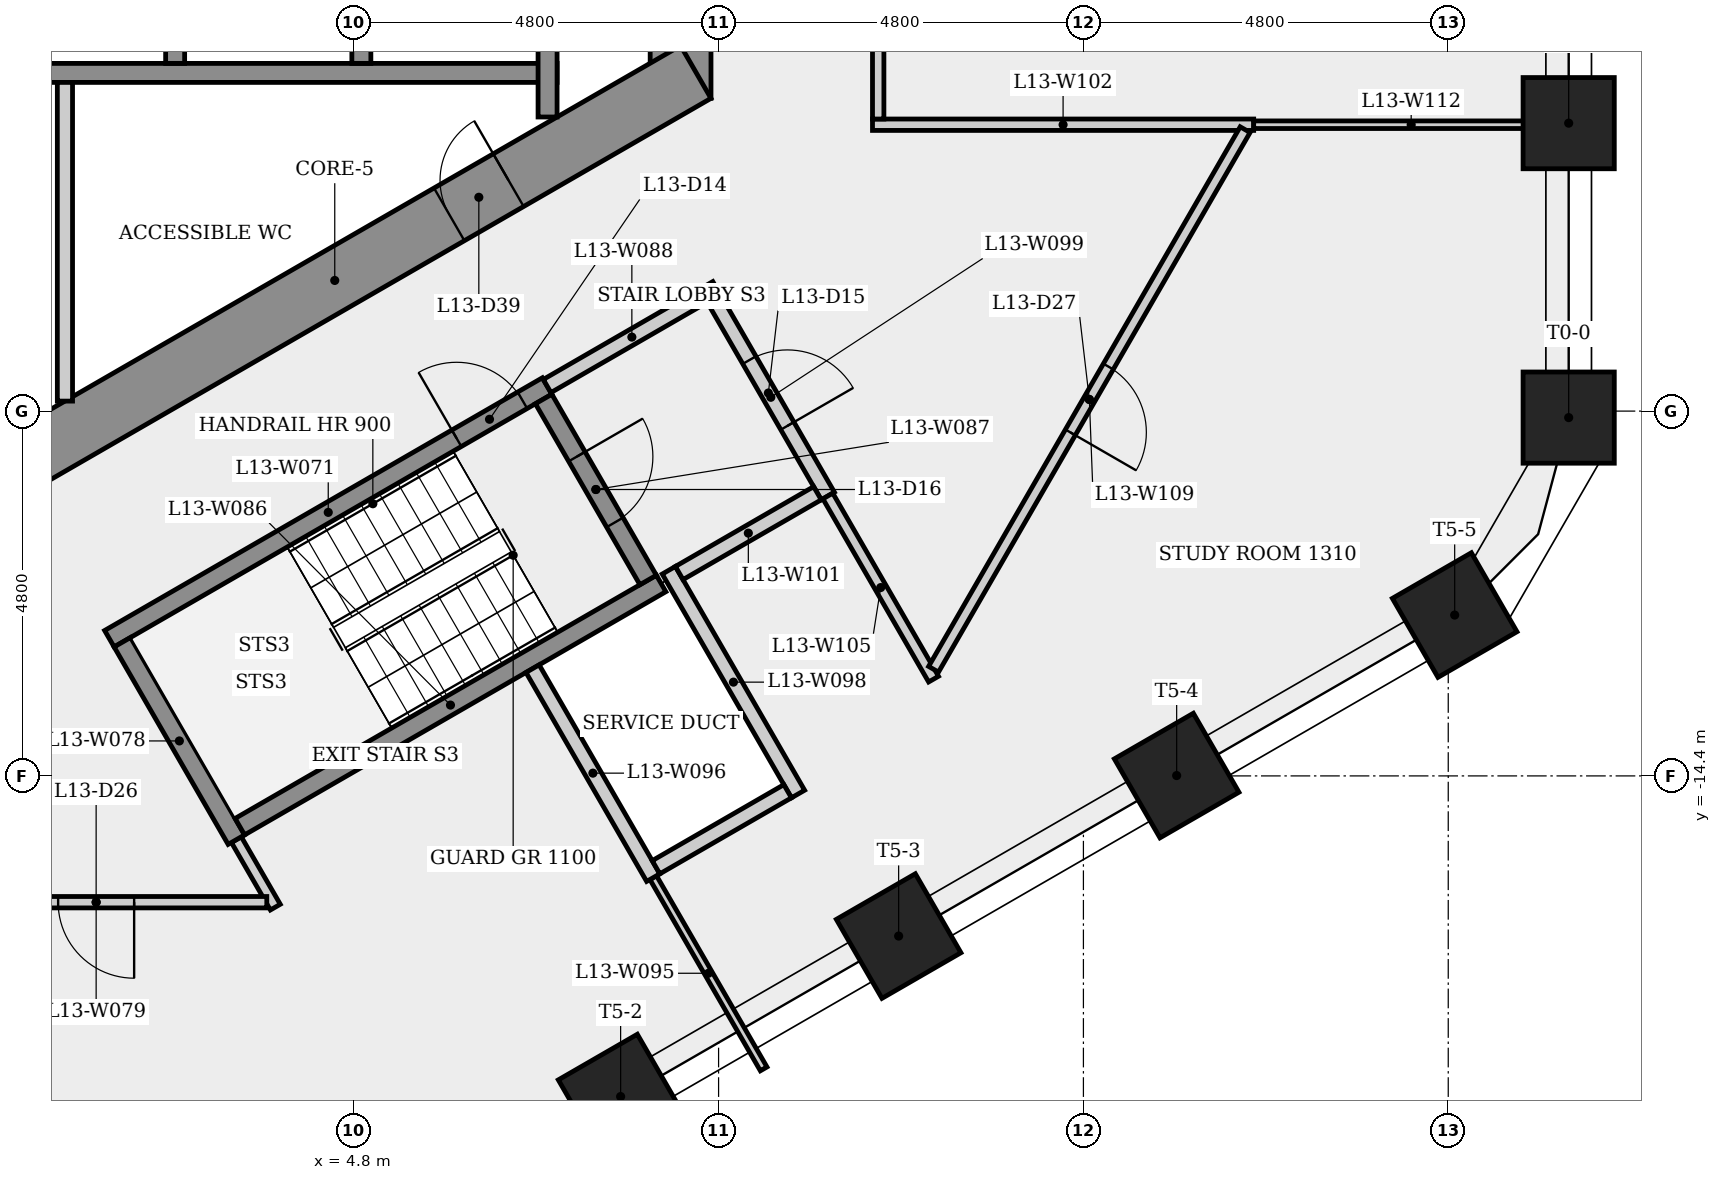
"""IFC4 building model, lengths in metres.
Left out: names, types, materials, properties, quantities, classifications, styles, units other than length and angle.
Written with IfcOpenShell. Run it as: python <this file> out.ifc"""

import sys

from ifc_helpers import new_model, si_unit, direction, frame, frame_2d, origin, origin_2d, place, context, subcontext, project, spatial, rectangle, extrude, element, fill, save


model = new_model("IFC4")
c1 = context("Model", 3, precision=1e-05, world=origin(), true_north=direction((0.0, 1.0)))
c2 = subcontext(c1, "Body", "Model", "MODEL_VIEW")
j1 = project(units=[si_unit("LENGTHUNIT", "METRE"), si_unit("PLANEANGLEUNIT", "RADIAN")], contexts=[c1])
p1 = place(None, origin())
s1 = spatial("IfcSite", under=j1, at=p1, CompositionType="ELEMENT")
p2 = place(p1, origin())
s2 = spatial("IfcBuilding", under=s1, at=p2, CompositionType="ELEMENT")
p3 = place(p2, frame((0.0, 0.0, 52.7)))
s3 = spatial("IfcBuildingStorey", under=s2, at=p3, CompositionType="ELEMENT", Elevation=52.7)
p4 = place(p3, frame((9.1, -5.485, 0.0), z_axis=(0.0, 0.0, 1.0), x_axis=(0.0, 1.0, 0.0)))
e1 = element("IfcWall", 1, at=p4, inside=s3, PredefinedType="SHEAR", context=c2, shape_type="SweptSolid", body=[
    extrude(rectangle(XDim=10.97, YDim=0.8, at=frame_2d((5.485, 0.0))), origin(), (0.0, 0.0, 1.0), 3.4),
])
p5 = place(p4, frame((4.685, 0.0, 0.0)))
e2 = element("IfcOpeningElement", 2, at=p5, cuts=e1, PredefinedType="OPENING", context=c2, shape_type="SweptSolid", body=[
    extrude(rectangle(XDim=1.6, YDim=2.1, at=frame_2d((0.8, 1.05))), frame((0.0, 0.41, 0.0), z_axis=(0.0, -1.0, 0.0), x_axis=(1.0, 0.0, 0.0)), (0.0, 0.0, 1.0), 0.82),
])
p6 = place(p3, frame((-0.2, -10.623, 0.0), z_axis=(0.0, 0.0, 1.0), x_axis=(0.866023993627, 0.500002442456, 0.0)))
e3 = element("IfcWall", 3, at=p6, inside=s3, PredefinedType="SHEAR", context=c2, shape_type="SweptSolid", body=[
    extrude(rectangle(XDim=10.97, YDim=0.8, at=frame_2d((5.485, 0.0))), origin(), (0.0, 0.0, 1.0), 3.4),
])
p7 = place(p6, frame((7.224, 0.0, 0.0)))
e4 = element("IfcOpeningElement", 4, at=p7, cuts=e3, PredefinedType="OPENING", context=c2, shape_type="SweptSolid", body=[
    extrude(rectangle(XDim=0.9, YDim=2.1, at=frame_2d((0.45, 1.05))), frame((0.0, 0.41, 0.0), z_axis=(0.0, -1.0, 0.0), x_axis=(1.0, 0.0, 0.0)), (0.0, 0.0, 1.0), 0.82),
])
for number, where, z_axis, x_axis in (
    (5, (20.785, -9.686, 0.0), (0.0, 0.0, 1.0), (1.0, 0.0, 0.0)),
    (6, (20.785, -5.811, 0.0), (0.0, 0.0, 1.0), (1.0, 0.0, 0.0)),
    (7, (8.311, -18.619, 0.0), (0.0, 0.0, 1.0), (0.5, -0.866, 0.0)),
    (8, (11.969, -16.507, 0.0), (0.0, 0.0, 1.0), (0.5, -0.866, 0.0)),
    (9, (15.627, -14.395, 0.0), (0.0, 0.0, 1.0), (0.5, -0.866, 0.0)),
    (10, (19.285, -12.283, 0.0), (0.0, 0.0, 1.0), (0.5, -0.866, 0.0)),
):
    element("IfcColumn", number, at=place(p3, frame(where, z_axis=z_axis, x_axis=x_axis)), inside=s3, PredefinedType="COLUMN", context=c2, shape_type="SweptSolid", body=[
        extrude(rectangle(XDim=1.2, YDim=1.2, at=origin_2d()), origin(), (0.0, 0.0, 1.0), 3.4),
    ])
p8 = place(p3, frame((-7.225, -5.15, 0.0), z_axis=(0.0, 0.0, 1.0), x_axis=(1.0, 0.0, 0.0)))
e11 = element("IfcWall", 11, at=p8, inside=s3, PredefinedType="SHEAR", context=c2, shape_type="SweptSolid", body=[
    extrude(rectangle(XDim=14.7, YDim=0.25, at=frame_2d((7.35, 0.0))), origin(), (0.0, 0.0, 1.0), 3.05),
])
p9 = place(p3, frame((1.0, -5.275, 0.0), z_axis=(0.0, 0.0, 1.0), x_axis=(0.0, -1.0, 0.0)))
e12 = element("IfcWall", 12, at=p9, inside=s3, PredefinedType="PARTITIONING", context=c2, shape_type="SweptSolid", body=[
    extrude(rectangle(XDim=4.194, YDim=0.2, at=frame_2d((2.097, 0.0))), origin(), (0.0, 0.0, 1.0), 3.05),
])
p10 = place(p3, frame((1.585, -12.595, 0.0), z_axis=(0.0, 0.0, 1.0), x_axis=(0.866036417653, 0.499980922934, 0.0)))
e13 = element("IfcWall", 13, at=p10, inside=s3, PredefinedType="SHEAR", context=c2, shape_type="SweptSolid", body=[
    extrude(rectangle(XDim=6.65, YDim=0.25, at=frame_2d((3.325, 0.0))), origin(), (0.0, 0.0, 1.0), 3.05),
])
p11 = place(p10, frame((5.275, 0.0, 0.0)))
e14 = element("IfcOpeningElement", 14, at=p11, cuts=e13, PredefinedType="OPENING", context=c2, shape_type="SweptSolid", body=[
    extrude(rectangle(XDim=1.0, YDim=2.1, at=frame_2d((0.5, 1.05))), frame((0.0, 0.135, 0.0), z_axis=(0.0, -1.0, 0.0), x_axis=(1.0, 0.0, 0.0)), (0.0, 0.0, 1.0), 0.27),
])
p12 = place(p3, frame((2.45, -1.925, 0.0), z_axis=(0.0, 0.0, 1.0), x_axis=(0.0, -1.0, 0.0)))
e15 = element("IfcWall", 15, at=p12, inside=s3, PredefinedType="SHEAR", context=c2, shape_type="SweptSolid", body=[
    extrude(rectangle(XDim=3.1, YDim=0.25, at=frame_2d((1.55, 0.0))), origin(), (0.0, 0.0, 1.0), 3.4),
])
p13 = place(p3, frame((3.256, -15.239, 0.0), z_axis=(0.0, 0.0, 1.0), x_axis=(0.50003162148, -0.866007146345, 0.0)))
e16 = element("IfcWall", 16, at=p13, inside=s3, PredefinedType="PARTITIONING", context=c2, shape_type="SweptSolid", body=[
    extrude(rectangle(XDim=1.025, YDim=0.15, at=frame_2d((0.513, 0.0))), origin(), (0.0, 0.0, 1.0), 3.05),
])
p14 = place(p3, frame((3.256, -15.239, 0.0), z_axis=(0.0, 0.0, 1.0), x_axis=(-0.50002537861, 0.866010750942, 0.0)))
e17 = element("IfcWall", 17, at=p14, inside=s3, PredefinedType="SHEAR", context=c2, shape_type="SweptSolid", body=[
    extrude(rectangle(XDim=3.0, YDim=0.25, at=frame_2d((1.5, 0.0))), origin(), (0.0, 0.0, 1.0), 3.05),
])
p15 = place(p3, frame((3.656, -16.062, 0.0), z_axis=(0.0, 0.0, 1.0), x_axis=(-1.0, 0.0, 0.0)))
e18 = element("IfcWall", 18, at=p15, inside=s3, PredefinedType="PARTITIONING", context=c2, shape_type="SweptSolid", body=[
    extrude(rectangle(XDim=4.49, YDim=0.15, at=frame_2d((2.245, 0.0))), origin(), (0.0, 0.0, 1.0), 3.05),
])
p16 = place(p15, frame((1.745, 0.0, 0.0)))
e19 = element("IfcOpeningElement", 19, at=p16, cuts=e18, PredefinedType="OPENING", context=c2, shape_type="SweptSolid", body=[
    extrude(rectangle(XDim=1.0, YDim=2.1, at=frame_2d((0.5, 1.05))), frame((0.0, 0.085, 0.0), z_axis=(0.0, -1.0, 0.0), x_axis=(1.0, 0.0, 0.0)), (0.0, 0.0, 1.0), 0.17),
])
p17 = place(p3, frame((4.9, -1.925, 0.0), z_axis=(0.0, 0.0, 1.0), x_axis=(0.0, -1.0, 0.0)))
e20 = element("IfcWall", 20, at=p17, inside=s3, PredefinedType="SHEAR", context=c2, shape_type="SweptSolid", body=[
    extrude(rectangle(XDim=3.1, YDim=0.25, at=frame_2d((1.55, 0.0))), origin(), (0.0, 0.0, 1.0), 3.4),
])
p18 = place(p3, frame((3.301, -15.068, 0.0), z_axis=(0.0, 0.0, 1.0), x_axis=(0.866035036182, 0.499983315828, 0.0)))
e21 = element("IfcWall", 21, at=p18, inside=s3, PredefinedType="SHEAR", context=c2, shape_type="SweptSolid", body=[
    extrude(rectangle(XDim=6.4, YDim=0.25, at=frame_2d((3.2, 0.0))), origin(), (0.0, 0.0, 1.0), 3.05),
])
p19 = place(p3, frame((7.298, -9.441, 0.0), z_axis=(0.0, 0.0, 1.0), x_axis=(0.500034990121, -0.866005201286, 0.0)))
e22 = element("IfcWall", 22, at=p19, inside=s3, PredefinedType="SHEAR", context=c2, shape_type="SweptSolid", body=[
    extrude(rectangle(XDim=2.75, YDim=0.25, at=frame_2d((1.375, 0.0))), origin(), (0.0, 0.0, 1.0), 3.05),
])
p20 = place(p19, frame((0.875, 0.0, 0.0)))
e23 = element("IfcOpeningElement", 23, at=p20, cuts=e22, PredefinedType="OPENING", context=c2, shape_type="SweptSolid", body=[
    extrude(rectangle(XDim=1.0, YDim=2.1, at=frame_2d((0.5, 1.05))), frame((0.0, 0.135, 0.0), z_axis=(0.0, -1.0, 0.0), x_axis=(1.0, 0.0, 0.0)), (0.0, 0.0, 1.0), 0.27),
])
p21 = place(p3, frame((7.344, -9.27, 0.0), z_axis=(0.0, 0.0, 1.0), x_axis=(0.866005588531, 0.500034319456, 0.0)))
e24 = element("IfcWall", 24, at=p21, inside=s3, PredefinedType="PARTITIONING", context=c2, shape_type="SweptSolid", body=[
    extrude(rectangle(XDim=2.575, YDim=0.2, at=frame_2d((1.288, 0.0))), origin(), (0.0, 0.0, 1.0), 3.05),
])
p22 = place(p3, frame((7.35, -1.925, 0.0), z_axis=(0.0, 0.0, 1.0), x_axis=(0.0, -1.0, 0.0)))
e25 = element("IfcWall", 25, at=p22, inside=s3, PredefinedType="SHEAR", context=c2, shape_type="SweptSolid", body=[
    extrude(rectangle(XDim=3.805, YDim=0.25, at=frame_2d((1.903, 0.0))), origin(), (0.0, 0.0, 1.0), 3.05),
])
p23 = place(p3, frame((8.74, -15.738, 0.0), z_axis=(0.0, 0.0, 1.0), x_axis=(0.500042431503, -0.866000904559, 0.0)))
e26 = element("IfcWall", 26, at=p23, inside=s3, PredefinedType="PARTITIONING", context=c2, shape_type="SweptSolid", body=[
    extrude(rectangle(XDim=2.906, YDim=0.1, at=frame_2d((1.453, 0.0))), origin(), (0.0, 0.0, 1.0), 3.05),
])
p24 = place(p3, frame((8.74, -15.739, 0.0), z_axis=(0.0, 0.0, 1.0), x_axis=(-0.500017526161, 0.866015284814, 0.0)))
e27 = element("IfcWall", 27, at=p24, inside=s3, PredefinedType="PLUMBINGWALL", context=c2, shape_type="SweptSolid", body=[
    extrude(rectangle(XDim=3.175, YDim=0.2, at=frame_2d((1.588, 0.0))), origin(), (0.0, 0.0, 1.0), 3.05),
])
p25 = place(p3, frame((8.945, -11.694, 0.0), z_axis=(0.0, 0.0, 1.0), x_axis=(0.500062241894, -0.865989465428, 0.0)))
e28 = element("IfcWall", 28, at=p25, inside=s3, PredefinedType="PLUMBINGWALL", context=c2, shape_type="SweptSolid", body=[
    extrude(rectangle(XDim=3.4, YDim=0.2, at=frame_2d((1.7, 0.0))), origin(), (0.0, 0.0, 1.0), 3.05),
])
p26 = place(p3, frame((9.537, -8.119, 0.0), z_axis=(0.0, 0.0, 1.0), x_axis=(0.499990139034, -0.866031096941, 0.0)))
e29 = element("IfcWall", 29, at=p26, inside=s3, PredefinedType="PARTITIONING", context=c2, shape_type="SweptSolid", body=[
    extrude(rectangle(XDim=3.0, YDim=0.2, at=frame_2d((1.5, 0.0))), origin(), (0.0, 0.0, 1.0), 3.05),
])
p27 = place(p26, frame((0.935, 0.0, 0.0)))
e30 = element("IfcOpeningElement", 30, at=p27, cuts=e29, PredefinedType="OPENING", context=c2, shape_type="SweptSolid", body=[
    extrude(rectangle(XDim=1.0, YDim=2.1, at=frame_2d((0.5, 1.05))), frame((0.0, 0.11, 0.0), z_axis=(0.0, -1.0, 0.0), x_axis=(1.0, 0.0, 0.0)), (0.0, 0.0, 1.0), 0.22),
])
p28 = place(p3, frame((10.509, -14.602, 0.0), z_axis=(0.0, 0.0, 1.0), x_axis=(-0.866010750942, -0.50002537861, 0.0)))
e31 = element("IfcWall", 31, at=p28, inside=s3, PredefinedType="PLUMBINGWALL", context=c2, shape_type="SweptSolid", body=[
    extrude(rectangle(XDim=2.0, YDim=0.2, at=frame_2d((1.0, 0.0))), origin(), (0.0, 0.0, 1.0), 3.05),
])
p29 = place(p3, frame((10.901, -10.681, 0.0), z_axis=(0.0, 0.0, 1.0), x_axis=(-0.866009402589, -0.500027713859, 0.0)))
e32 = element("IfcWall", 32, at=p29, inside=s3, PredefinedType="PARTITIONING", context=c2, shape_type="SweptSolid", body=[
    extrude(rectangle(XDim=2.1, YDim=0.2, at=frame_2d((1.05, 0.0))), origin(), (0.0, 0.0, 1.0), 3.05),
])
p30 = place(p3, frame((11.625, -5.832, 0.0), z_axis=(0.0, 0.0, 1.0), x_axis=(1.0, 0.0, 0.0)))
e33 = element("IfcWall", 33, at=p30, inside=s3, PredefinedType="PARTITIONING", context=c2, shape_type="SweptSolid", body=[
    extrude(rectangle(XDim=5.015, YDim=0.15, at=frame_2d((2.508, 0.0))), origin(), (0.0, 0.0, 1.0), 3.05),
])
p31 = place(p3, frame((11.7, 5.907, 0.0), z_axis=(0.0, 0.0, 1.0), x_axis=(0.0, -1.0, 0.0)))
e34 = element("IfcWall", 34, at=p31, inside=s3, PredefinedType="PARTITIONING", context=c2, shape_type="SweptSolid", body=[
    extrude(rectangle(XDim=11.664, YDim=0.15, at=frame_2d((5.832, 0.0))), origin(), (0.0, 0.0, 1.0), 3.05),
])
p32 = place(p31, frame((5.369, 0.0, 0.0)))
e35 = element("IfcOpeningElement", 35, at=p32, cuts=e34, PredefinedType="OPENING", context=c2, shape_type="SweptSolid", body=[
    extrude(rectangle(XDim=1.0, YDim=2.1, at=frame_2d((0.5, 1.05))), frame((0.0, 0.085, 0.0), z_axis=(0.0, -1.0, 0.0), x_axis=(1.0, 0.0, 0.0)), (0.0, 0.0, 1.0), 0.17),
])
p33 = place(p3, frame((12.428, -13.127, 0.0), z_axis=(0.0, 0.0, 1.0), x_axis=(-0.4999705729, 0.866042392862, 0.0)))
e36 = element("IfcWall", 36, at=p33, inside=s3, PredefinedType="PARTITIONING", context=c2, shape_type="SweptSolid", body=[
    extrude(rectangle(XDim=2.782, YDim=0.15, at=frame_2d((1.391, 0.0))), origin(), (0.0, 0.0, 1.0), 3.05),
])
p34 = place(p3, frame((16.528, -5.897, 0.0), z_axis=(0.0, 0.0, 1.0), x_axis=(-0.499988821041, -0.866031857863, 0.0)))
e37 = element("IfcWall", 37, at=p34, inside=s3, PredefinedType="PARTITIONING", context=c2, shape_type="SweptSolid", body=[
    extrude(rectangle(XDim=8.198, YDim=0.15, at=frame_2d((4.099, 0.0))), origin(), (0.0, 0.0, 1.0), 3.05),
])
p35 = place(p34, frame((3.599, 0.0, 0.0)))
e38 = element("IfcOpeningElement", 38, at=p35, cuts=e37, PredefinedType="OPENING", context=c2, shape_type="SweptSolid", body=[
    extrude(rectangle(XDim=1.0, YDim=2.1, at=frame_2d((0.5, 1.05))), frame((0.0, 0.085, 0.0), z_axis=(0.0, -1.0, 0.0), x_axis=(1.0, 0.0, 0.0)), (0.0, 0.0, 1.0), 0.17),
])
p36 = place(p3, frame((20.785, -5.832, 0.0), z_axis=(0.0, 0.0, 1.0), x_axis=(-1.0, 0.0, 0.0)))
e39 = element("IfcWall", 39, at=p36, inside=s3, PredefinedType="PARTITIONING", context=c2, shape_type="SweptSolid", body=[
    extrude(rectangle(XDim=4.145, YDim=0.1, at=frame_2d((2.072, 0.0))), origin(), (0.0, 0.0, 1.0), 3.05),
])
p37 = place(p11, origin())
e40 = element("IfcDoor", 40, at=p37, inside=s3, OperationType="SINGLE_SWING_LEFT", PredefinedType="DOOR", context=c2, shape_type="SweptSolid", body=[
    extrude(rectangle(XDim=1.0, YDim=2.1, at=frame_2d((0.5, 1.05))), frame((0.0, 0.025, 0.0), z_axis=(0.0, -1.0, 0.0), x_axis=(1.0, 0.0, 0.0)), (0.0, 0.0, 1.0), 0.05),
])
fill(e14, e40)
p38 = place(p27, origin())
e41 = element("IfcDoor", 41, at=p38, inside=s3, OperationType="SINGLE_SWING_RIGHT", PredefinedType="DOOR", context=c2, shape_type="SweptSolid", body=[
    extrude(rectangle(XDim=1.0, YDim=2.1, at=frame_2d((0.5, 1.05))), frame((0.0, 0.025, 0.0), z_axis=(0.0, -1.0, 0.0), x_axis=(1.0, 0.0, 0.0)), (0.0, 0.0, 1.0), 0.05),
])
fill(e30, e41)
p39 = place(p20, origin())
e42 = element("IfcDoor", 42, at=p39, inside=s3, OperationType="SINGLE_SWING_LEFT", PredefinedType="DOOR", context=c2, shape_type="SweptSolid", body=[
    extrude(rectangle(XDim=1.0, YDim=2.1, at=frame_2d((0.5, 1.05))), frame((0.0, 0.025, 0.0), z_axis=(0.0, -1.0, 0.0), x_axis=(1.0, 0.0, 0.0)), (0.0, 0.0, 1.0), 0.05),
])
fill(e23, e42)
p40 = place(p16, origin())
e43 = element("IfcDoor", 43, at=p40, inside=s3, OperationType="SINGLE_SWING_LEFT", PredefinedType="DOOR", context=c2, shape_type="SweptSolid", body=[
    extrude(rectangle(XDim=1.0, YDim=2.1, at=frame_2d((0.5, 1.05))), frame((0.0, 0.025, 0.0), z_axis=(0.0, -1.0, 0.0), x_axis=(1.0, 0.0, 0.0)), (0.0, 0.0, 1.0), 0.05),
])
fill(e19, e43)
p41 = place(p35, origin())
e44 = element("IfcDoor", 44, at=p41, inside=s3, OperationType="SINGLE_SWING_RIGHT", PredefinedType="DOOR", context=c2, shape_type="SweptSolid", body=[
    extrude(rectangle(XDim=1.0, YDim=2.1, at=frame_2d((0.5, 1.05))), frame((0.0, 0.025, 0.0), z_axis=(0.0, -1.0, 0.0), x_axis=(1.0, 0.0, 0.0)), (0.0, 0.0, 1.0), 0.05),
])
fill(e38, e44)
p42 = place(p7, origin())
e45 = element("IfcDoor", 45, at=p42, inside=s3, OperationType="SINGLE_SWING_RIGHT", PredefinedType="DOOR", context=c2, shape_type="SweptSolid", body=[
    extrude(rectangle(XDim=0.9, YDim=2.1, at=frame_2d((0.45, 1.05))), frame((0.0, 0.025, 0.0), z_axis=(0.0, -1.0, 0.0), x_axis=(1.0, 0.0, 0.0)), (0.0, 0.0, 1.0), 0.05),
])
fill(e4, e45)
save(model, sys.argv[1])
